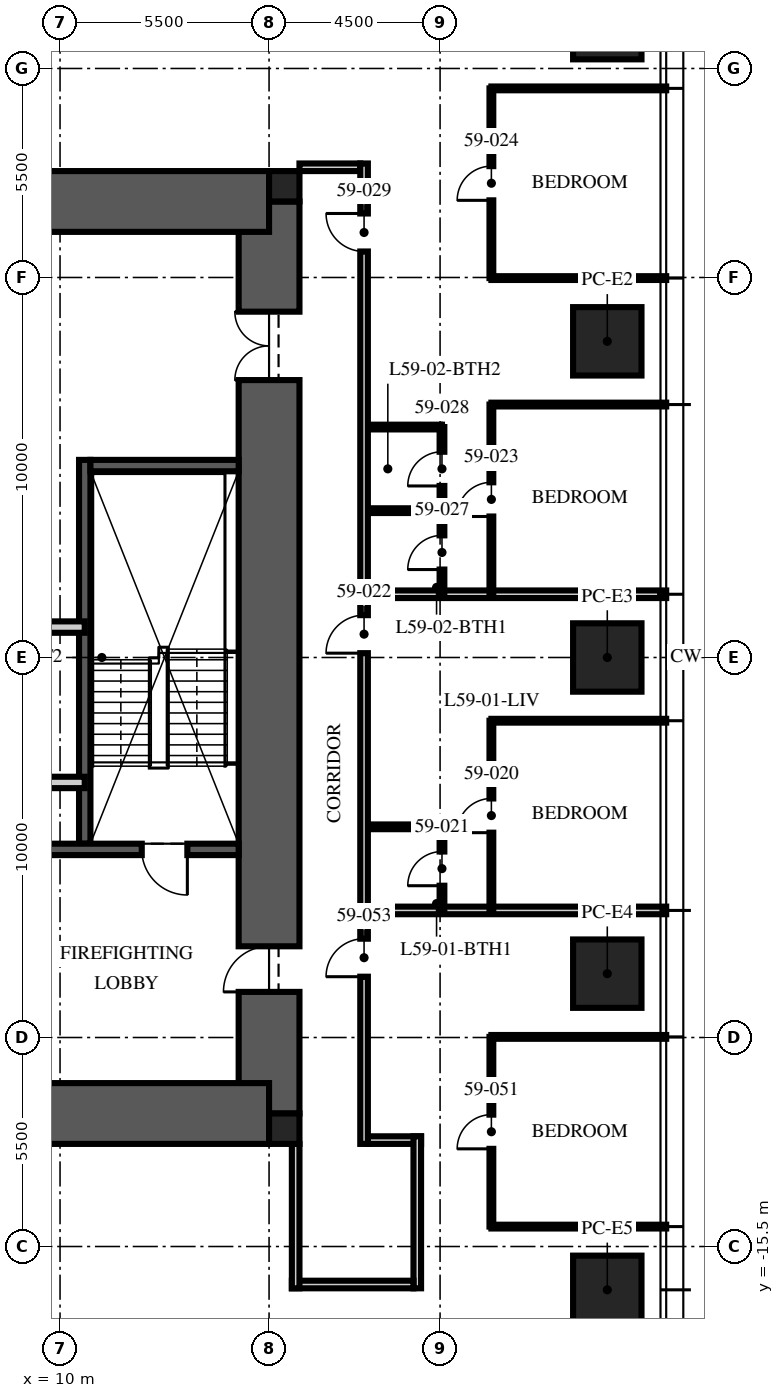
"""IFC4 building model, lengths in metres.
Left out: names, types, materials, properties, quantities, classifications, styles, units other than length and angle.
Written with IfcOpenShell. Run it as: python <this file> out.ifc"""

import sys

from ifc_helpers import new_model, si_unit, direction, frame, frame_2d, origin, origin_2d, place, context, subcontext, project, spatial, rectangle, extrude, element, fill, save


model = new_model("IFC4")
c1 = context("Model", 3, precision=1e-05, world=origin(), true_north=direction((0.0, 1.0)))
c2 = subcontext(c1, "Body", "Model", "MODEL_VIEW")
j1 = project(units=[si_unit("LENGTHUNIT", "METRE"), si_unit("PLANEANGLEUNIT", "RADIAN")], contexts=[c1])
p1 = place(None, origin())
s1 = spatial("IfcSite", under=j1, at=p1, CompositionType="ELEMENT")
p2 = place(p1, origin())
s2 = spatial("IfcBuilding", under=s1, at=p2, CompositionType="ELEMENT")
p3 = place(p2, frame((0.0, 0.0, 237.0)))
s3 = spatial("IfcBuildingStorey", under=s2, at=p3, CompositionType="ELEMENT", Elevation=237.0)
p4 = place(p3, frame((15.5, -12.0, -0.25), z_axis=(0.0, 0.0, 1.0), x_axis=(0.0, 1.0, 0.0)))
e1 = element("IfcWall", 1, at=p4, inside=s3, PredefinedType="SHEAR", context=c2, shape_type="SweptSolid", body=[
    extrude(rectangle(XDim=24.0, YDim=1.6, at=frame_2d((12.0, 0.0))), origin(), (0.0, 0.0, 1.0), 3.75),
])
p5 = place(p4, frame((3.2, 0.0, 0.25)))
e2 = element("IfcOpeningElement", 2, at=p5, cuts=e1, PredefinedType="OPENING", context=c2, shape_type="SweptSolid", body=[
    extrude(rectangle(XDim=1.2, YDim=2.1, at=frame_2d((0.6, 1.05))), frame((0.0, 0.81, 0.0), z_axis=(0.0, -1.0, 0.0), x_axis=(1.0, 0.0, 0.0)), (0.0, 0.0, 1.0), 1.62),
])
p6 = place(p4, frame((19.3, 0.0, 0.25)))
e3 = element("IfcOpeningElement", 3, at=p6, cuts=e1, PredefinedType="OPENING", context=c2, shape_type="SweptSolid", body=[
    extrude(rectangle(XDim=1.8, YDim=2.1, at=frame_2d((0.9, 1.05))), frame((0.0, 0.81, 0.0), z_axis=(0.0, -1.0, 0.0), x_axis=(1.0, 0.0, 0.0)), (0.0, 0.0, 1.0), 1.62),
])
for number, where, z_axis, x_axis in (
    (4, (-15.5, 12.0, -0.25), (0.0, 0.0, 1.0), (1.0, 0.0, 0.0)),
    (5, (-15.5, -12.0, -0.25), (0.0, 0.0, 1.0), (1.0, 0.0, 0.0)),
):
    element("IfcWall", number, at=place(p3, frame(where, z_axis=z_axis, x_axis=x_axis)), inside=s3, PredefinedType="SHEAR", context=c2, shape_type="SweptSolid", body=[
        extrude(rectangle(XDim=31.0, YDim=1.6, at=frame_2d((15.5, 0.0))), origin(), (0.0, 0.0, 1.0), 3.75),
    ])
for number, where, z_axis, x_axis in (
    (6, (15.9, 12.4, -0.25), (0.0, 0.0, 1.0), (1.0, 0.0, 0.0)),
    (7, (15.9, -12.4, -0.25), (0.0, 0.0, 1.0), (1.0, 0.0, 0.0)),
):
    element("IfcColumn", number, at=place(p3, frame(where, z_axis=z_axis, x_axis=x_axis)), inside=s3, PredefinedType="COLUMN", context=c2, shape_type="SweptSolid", body=[
        extrude(rectangle(XDim=0.8, YDim=0.8, at=origin_2d()), origin(), (0.0, 0.0, 1.0), 3.75),
    ])
for number, where, z_axis, x_axis in (
    (8, (24.4, 16.64, 0.0), (0.0, 0.0, 1.0), (0.0, 1.0, 0.0)),
    (9, (24.4, 8.32, 0.0), (0.0, 0.0, 1.0), (0.0, 1.0, 0.0)),
    (10, (24.4, 0.0, 0.0), (0.0, 0.0, 1.0), (0.0, 1.0, 0.0)),
    (11, (24.4, -8.32, 0.0), (0.0, 0.0, 1.0), (0.0, 1.0, 0.0)),
    (12, (24.4, -16.64, 0.0), (0.0, 0.0, 1.0), (0.0, 1.0, 0.0)),
):
    element("IfcColumn", number, at=place(p3, frame(where, z_axis=z_axis, x_axis=x_axis)), inside=s3, PredefinedType="COLUMN", context=c2, shape_type="SweptSolid", body=[
        extrude(rectangle(XDim=1.8, YDim=1.8, at=origin_2d()), origin(), (0.0, 0.0, 1.0), 3.75),
    ])
p7 = place(p3, frame((10.65, -4.9, 0.0), z_axis=(0.0, 0.0, 1.0), x_axis=(0.0, 1.0, 0.0)))
e13 = element("IfcWall", 13, at=p7, inside=s3, PredefinedType="SOLIDWALL", context=c2, shape_type="SweptSolid", body=[
    extrude(rectangle(XDim=10.1, YDim=0.3, at=frame_2d((5.05, 0.0))), origin(), (0.0, 0.0, 1.0), 3.5),
])
p8 = place(p3, frame((14.7, -5.05, 0.0), z_axis=(0.0, 0.0, 1.0), x_axis=(-1.0, 0.0, 0.0)))
e14 = element("IfcWall", 14, at=p8, inside=s3, PredefinedType="SOLIDWALL", context=c2, shape_type="SweptSolid", body=[
    extrude(rectangle(XDim=5.9, YDim=0.3, at=frame_2d((2.95, 0.0))), origin(), (0.0, 0.0, 1.0), 3.5),
])
p9 = place(p8, frame((1.35, 0.0, 0.0)))
e15 = element("IfcOpeningElement", 15, at=p9, cuts=e14, PredefinedType="OPENING", context=c2, shape_type="SweptSolid", body=[
    extrude(rectangle(XDim=1.2, YDim=2.1, at=frame_2d((0.6, 1.05))), frame((0.0, 0.16, 0.0), z_axis=(0.0, -1.0, 0.0), x_axis=(1.0, 0.0, 0.0)), (0.0, 0.0, 1.0), 0.32),
])
p10 = place(p3, frame((14.7, 5.05, 0.0), z_axis=(0.0, 0.0, 1.0), x_axis=(-1.0, 0.0, 0.0)))
e16 = element("IfcWall", 16, at=p10, inside=s3, PredefinedType="SOLIDWALL", context=c2, shape_type="SweptSolid", body=[
    extrude(rectangle(XDim=3.9, YDim=0.3, at=frame_2d((1.95, 0.0))), origin(), (0.0, 0.0, 1.0), 3.5),
])
p11 = place(p3, frame((-10.65, 0.8, 0.0), z_axis=(0.0, 0.0, 1.0), x_axis=(1.0, 0.0, 0.0)))
e17 = element("IfcWall", 17, at=p11, inside=s3, PredefinedType="PARTITIONING", context=c2, shape_type="SweptSolid", body=[
    extrude(rectangle(XDim=21.3, YDim=0.3, at=frame_2d((10.65, 0.0))), origin(), (0.0, 0.0, 1.0), 3.5),
])
p12 = place(p11, frame((10.05, 0.0, 0.0)))
e18 = element("IfcOpeningElement", 18, at=p12, cuts=e17, PredefinedType="OPENING", context=c2, shape_type="SweptSolid", body=[
    extrude(rectangle(XDim=1.2, YDim=2.1, at=frame_2d((0.6, 1.05))), frame((0.0, 0.16, 0.0), z_axis=(0.0, -1.0, 0.0), x_axis=(1.0, 0.0, 0.0)), (0.0, 0.0, 1.0), 0.32),
])
p13 = place(p11, frame((1.74, 0.0, 0.0)))
e19 = element("IfcOpeningElement", 19, at=p13, cuts=e17, PredefinedType="OPENING", context=c2, shape_type="SweptSolid", body=[
    extrude(rectangle(XDim=0.9, YDim=2.1, at=frame_2d((0.45, 1.05))), frame((0.0, 0.16, 0.0), z_axis=(0.0, -1.0, 0.0), x_axis=(1.0, 0.0, 0.0)), (0.0, 0.0, 1.0), 0.32),
])
p14 = place(p3, frame((10.65, -3.288, 0.0), z_axis=(0.0, 0.0, 1.0), x_axis=(-1.0, 0.0, 0.0)))
e20 = element("IfcWall", 20, at=p14, inside=s3, PredefinedType="PARTITIONING", context=c2, shape_type="SweptSolid", body=[
    extrude(rectangle(XDim=7.35, YDim=0.3, at=frame_2d((3.675, 0.0))), origin(), (0.0, 0.0, 1.0), 3.5),
])
p15 = place(p3, frame((18.1, -12.7, 0.0), z_axis=(0.0, 0.0, 1.0), x_axis=(1.0, 0.0, 0.0)))
e21 = element("IfcWall", 21, at=p15, inside=s3, PredefinedType="PARTITIONING", context=c2, shape_type="SweptSolid", body=[
    extrude(rectangle(XDim=1.4, YDim=0.2, at=frame_2d((0.7, 0.0))), origin(), (0.0, 0.0, 1.0), 2.81),
])
p16 = place(p3, frame((19.4, -12.6, 0.0), z_axis=(0.0, 0.0, 1.0), x_axis=(0.0, -1.0, 0.0)))
e22 = element("IfcWall", 22, at=p16, inside=s3, PredefinedType="PARTITIONING", context=c2, shape_type="SweptSolid", body=[
    extrude(rectangle(XDim=4.0, YDim=0.2, at=frame_2d((2.0, 0.0))), origin(), (0.0, 0.0, 1.0), 2.6),
])
p17 = place(p3, frame((19.3, -16.5, 0.0), z_axis=(0.0, 0.0, 1.0), x_axis=(-1.0, 0.0, 0.0)))
e23 = element("IfcWall", 23, at=p17, inside=s3, PredefinedType="PARTITIONING", context=c2, shape_type="SweptSolid", body=[
    extrude(rectangle(XDim=3.2, YDim=0.2, at=frame_2d((1.6, 0.0))), origin(), (0.0, 0.0, 1.0), 2.3),
])
p18 = place(p3, frame((16.2, -16.6, 0.0), z_axis=(0.0, 0.0, 1.0), x_axis=(0.0, 1.0, 0.0)))
e24 = element("IfcWall", 24, at=p18, inside=s3, PredefinedType="PARTITIONING", context=c2, shape_type="SweptSolid", body=[
    extrude(rectangle(XDim=3.8, YDim=0.2, at=frame_2d((1.9, 0.0))), origin(), (0.0, 0.0, 1.0), 2.3),
])
p19 = place(p3, frame((16.3, 12.9, 0.0), z_axis=(0.0, 0.0, 1.0), x_axis=(1.0, 0.0, 0.0)))
e25 = element("IfcWall", 25, at=p19, inside=s3, PredefinedType="PARTITIONING", context=c2, shape_type="SweptSolid", body=[
    extrude(rectangle(XDim=1.6, YDim=0.2, at=frame_2d((0.8, 0.0))), origin(), (0.0, 0.0, 1.0), 2.3),
])
p20 = place(p3, frame((18.1, -6.656, 0.0), z_axis=(0.0, 0.0, 1.0), x_axis=(1.0, 0.0, 0.0)))
e26 = element("IfcWall", 26, at=p20, inside=s3, PredefinedType="PARTITIONING", context=c2, shape_type="SweptSolid", body=[
    extrude(rectangle(XDim=7.85, YDim=0.2, at=frame_2d((3.925, 0.0))), origin(), (0.0, 0.0, 1.0), 2.91),
])
p21 = place(p3, frame((21.35, -1.664, 0.0), z_axis=(0.0, 0.0, 1.0), x_axis=(1.0, 0.0, 0.0)))
e27 = element("IfcWall", 27, at=p21, inside=s3, PredefinedType="PARTITIONING", context=c2, shape_type="SweptSolid", body=[
    extrude(rectangle(XDim=4.6, YDim=0.1, at=frame_2d((2.3, 0.0))), origin(), (0.0, 0.0, 1.0), 2.91),
])
p22 = place(p3, frame((18.1, 1.664, 0.0), z_axis=(0.0, 0.0, 1.0), x_axis=(1.0, 0.0, 0.0)))
e28 = element("IfcWall", 28, at=p22, inside=s3, PredefinedType="PARTITIONING", context=c2, shape_type="SweptSolid", body=[
    extrude(rectangle(XDim=7.85, YDim=0.2, at=frame_2d((3.925, 0.0))), origin(), (0.0, 0.0, 1.0), 2.91),
])
for number, where, z_axis, x_axis in (
    (29, (21.35, 6.656, 0.0), (0.0, 0.0, 1.0), (1.0, 0.0, 0.0)),
    (30, (21.35, 9.984, 0.0), (0.0, 0.0, 1.0), (1.0, 0.0, 0.0)),
    (31, (21.35, 14.976, 0.0), (0.0, 0.0, 1.0), (1.0, 0.0, 0.0)),
    (32, (21.35, -14.976, 0.0), (0.0, 0.0, 1.0), (1.0, 0.0, 0.0)),
    (33, (21.35, -9.984, 0.0), (0.0, 0.0, 1.0), (1.0, 0.0, 0.0)),
):
    element("IfcWall", number, at=place(p3, frame(where, z_axis=z_axis, x_axis=x_axis)), inside=s3, PredefinedType="PARTITIONING", context=c2, shape_type="SweptSolid", body=[
        extrude(rectangle(XDim=4.6, YDim=0.1, at=frame_2d((2.3, 0.0))), origin(), (0.0, 0.0, 1.0), 2.91),
    ])
p23 = place(p3, frame((21.35, -6.656, 0.0), z_axis=(0.0, 0.0, 1.0), x_axis=(0.0, 1.0, 0.0)))
e34 = element("IfcWall", 34, at=p23, inside=s3, PredefinedType="PARTITIONING", context=c2, shape_type="SweptSolid", body=[
    extrude(rectangle(XDim=4.992, YDim=0.1, at=frame_2d((2.496, 0.0))), origin(), (0.0, 0.0, 1.0), 2.81),
])
p24 = place(p23, frame((2.046, 0.0, 0.0)))
e35 = element("IfcOpeningElement", 35, at=p24, cuts=e34, PredefinedType="OPENING", context=c2, shape_type="SweptSolid", body=[
    extrude(rectangle(XDim=0.9, YDim=2.1, at=frame_2d((0.45, 1.05))), frame((0.0, 0.06, 0.0), z_axis=(0.0, -1.0, 0.0), x_axis=(1.0, 0.0, 0.0)), (0.0, 0.0, 1.0), 0.12),
])
p25 = place(p3, frame((20.05, -6.656, 0.0), z_axis=(0.0, 0.0, 1.0), x_axis=(0.0, 1.0, 0.0)))
e36 = element("IfcWall", 36, at=p25, inside=s3, PredefinedType="PARTITIONING", context=c2, shape_type="SweptSolid", body=[
    extrude(rectangle(XDim=2.2, YDim=0.125, at=frame_2d((1.1, 0.0))), origin(), (0.0, 0.0, 1.0), 3.5),
])
p26 = place(p25, frame((0.65, 0.0, 0.0)))
e37 = element("IfcOpeningElement", 37, at=p26, cuts=e36, PredefinedType="OPENING", context=c2, shape_type="SweptSolid", body=[
    extrude(rectangle(XDim=0.9, YDim=2.1, at=frame_2d((0.45, 1.05))), frame((0.0, 0.073, 0.0), z_axis=(0.0, -1.0, 0.0), x_axis=(1.0, 0.0, 0.0)), (0.0, 0.0, 1.0), 0.145),
])
p27 = place(p3, frame((18.1, -4.456, 0.0), z_axis=(0.0, 0.0, 1.0), x_axis=(1.0, 0.0, 0.0)))
e38 = element("IfcWall", 38, at=p27, inside=s3, PredefinedType="PARTITIONING", context=c2, shape_type="SweptSolid", body=[
    extrude(rectangle(XDim=1.95, YDim=0.125, at=frame_2d((0.975, 0.0))), origin(), (0.0, 0.0, 1.0), 3.5),
])
p28 = place(p3, frame((21.35, 1.664, 0.0), z_axis=(0.0, 0.0, 1.0), x_axis=(0.0, 1.0, 0.0)))
e39 = element("IfcWall", 39, at=p28, inside=s3, PredefinedType="PARTITIONING", context=c2, shape_type="SweptSolid", body=[
    extrude(rectangle(XDim=4.992, YDim=0.1, at=frame_2d((2.496, 0.0))), origin(), (0.0, 0.0, 1.0), 2.81),
])
p29 = place(p28, frame((2.046, 0.0, 0.0)))
e40 = element("IfcOpeningElement", 40, at=p29, cuts=e39, PredefinedType="OPENING", context=c2, shape_type="SweptSolid", body=[
    extrude(rectangle(XDim=0.9, YDim=2.1, at=frame_2d((0.45, 1.05))), frame((0.0, 0.06, 0.0), z_axis=(0.0, -1.0, 0.0), x_axis=(1.0, 0.0, 0.0)), (0.0, 0.0, 1.0), 0.12),
])
p30 = place(p3, frame((21.35, 9.984, 0.0), z_axis=(0.0, 0.0, 1.0), x_axis=(0.0, 1.0, 0.0)))
e41 = element("IfcWall", 41, at=p30, inside=s3, PredefinedType="PARTITIONING", context=c2, shape_type="SweptSolid", body=[
    extrude(rectangle(XDim=4.992, YDim=0.1, at=frame_2d((2.496, 0.0))), origin(), (0.0, 0.0, 1.0), 2.81),
])
p31 = place(p30, frame((2.046, 0.0, 0.0)))
e42 = element("IfcOpeningElement", 42, at=p31, cuts=e41, PredefinedType="OPENING", context=c2, shape_type="SweptSolid", body=[
    extrude(rectangle(XDim=0.9, YDim=2.1, at=frame_2d((0.45, 1.05))), frame((0.0, 0.06, 0.0), z_axis=(0.0, -1.0, 0.0), x_axis=(1.0, 0.0, 0.0)), (0.0, 0.0, 1.0), 0.12),
])
p32 = place(p3, frame((20.05, 1.664, 0.0), z_axis=(0.0, 0.0, 1.0), x_axis=(0.0, 1.0, 0.0)))
e43 = element("IfcWall", 43, at=p32, inside=s3, PredefinedType="PARTITIONING", context=c2, shape_type="SweptSolid", body=[
    extrude(rectangle(XDim=4.4, YDim=0.125, at=frame_2d((2.2, 0.0))), origin(), (0.0, 0.0, 1.0), 2.81),
])
p33 = place(p32, frame((0.65, 0.0, 0.0)))
e44 = element("IfcOpeningElement", 44, at=p33, cuts=e43, PredefinedType="OPENING", context=c2, shape_type="SweptSolid", body=[
    extrude(rectangle(XDim=0.9, YDim=2.1, at=frame_2d((0.45, 1.05))), frame((0.0, 0.073, 0.0), z_axis=(0.0, -1.0, 0.0), x_axis=(1.0, 0.0, 0.0)), (0.0, 0.0, 1.0), 0.145),
])
p34 = place(p32, frame((2.85, 0.0, 0.0)))
e45 = element("IfcOpeningElement", 45, at=p34, cuts=e43, PredefinedType="OPENING", context=c2, shape_type="SweptSolid", body=[
    extrude(rectangle(XDim=0.9, YDim=2.1, at=frame_2d((0.45, 1.05))), frame((0.0, 0.073, 0.0), z_axis=(0.0, -1.0, 0.0), x_axis=(1.0, 0.0, 0.0)), (0.0, 0.0, 1.0), 0.145),
])
for number, where, z_axis, x_axis in (
    (46, (18.1, 3.864, 0.0), (0.0, 0.0, 1.0), (1.0, 0.0, 0.0)),
    (47, (18.1, 6.064, 0.0), (0.0, 0.0, 1.0), (1.0, 0.0, 0.0)),
):
    element("IfcWall", number, at=place(p3, frame(where, z_axis=z_axis, x_axis=x_axis)), inside=s3, PredefinedType="PARTITIONING", context=c2, shape_type="SweptSolid", body=[
        extrude(rectangle(XDim=1.95, YDim=0.125, at=frame_2d((0.975, 0.0))), origin(), (0.0, 0.0, 1.0), 3.5),
    ])
p35 = place(p3, frame((21.35, -14.976, 0.0), z_axis=(0.0, 0.0, 1.0), x_axis=(0.0, 1.0, 0.0)))
e48 = element("IfcWall", 48, at=p35, inside=s3, PredefinedType="PARTITIONING", context=c2, shape_type="SweptSolid", body=[
    extrude(rectangle(XDim=4.992, YDim=0.1, at=frame_2d((2.496, 0.0))), origin(), (0.0, 0.0, 1.0), 2.81),
])
p36 = place(p35, frame((2.046, 0.0, 0.0)))
e49 = element("IfcOpeningElement", 49, at=p36, cuts=e48, PredefinedType="OPENING", context=c2, shape_type="SweptSolid", body=[
    extrude(rectangle(XDim=0.9, YDim=2.1, at=frame_2d((0.45, 1.05))), frame((0.0, 0.06, 0.0), z_axis=(0.0, -1.0, 0.0), x_axis=(1.0, 0.0, 0.0)), (0.0, 0.0, 1.0), 0.12),
])
p37 = place(p3, frame((18.0, -12.8, 0.0), z_axis=(0.0, 0.0, 1.0), x_axis=(0.0, 1.0, 0.0)))
e50 = element("IfcWall", 50, at=p37, inside=s3, PredefinedType="PARTITIONING", context=c2, shape_type="SweptSolid", body=[
    extrude(rectangle(XDim=25.8, YDim=0.2, at=frame_2d((12.9, 0.0))), origin(), (0.0, 0.0, 1.0), 2.6),
])
p38 = place(p37, frame((12.914, 0.0, 0.0)))
e51 = element("IfcOpeningElement", 51, at=p38, cuts=e50, PredefinedType="OPENING", context=c2, shape_type="SweptSolid", body=[
    extrude(rectangle(XDim=1.0, YDim=2.2, at=frame_2d((0.5, 1.1))), frame((0.0, 0.11, 0.0), z_axis=(0.0, -1.0, 0.0), x_axis=(1.0, 0.0, 0.0)), (0.0, 0.0, 1.0), 0.22),
])
p39 = place(p37, frame((23.484, 0.0, 0.0)))
e52 = element("IfcOpeningElement", 52, at=p39, cuts=e50, PredefinedType="OPENING", context=c2, shape_type="SweptSolid", body=[
    extrude(rectangle(XDim=1.0, YDim=2.2, at=frame_2d((0.5, 1.1))), frame((0.0, 0.11, 0.0), z_axis=(0.0, -1.0, 0.0), x_axis=(1.0, 0.0, 0.0)), (0.0, 0.0, 1.0), 0.22),
])
p40 = place(p37, frame((4.4, 0.0, 0.0)))
e53 = element("IfcOpeningElement", 53, at=p40, cuts=e50, PredefinedType="OPENING", context=c2, shape_type="SweptSolid", body=[
    extrude(rectangle(XDim=1.0, YDim=2.2, at=frame_2d((0.5, 1.1))), frame((0.0, 0.11, 0.0), z_axis=(0.0, -1.0, 0.0), x_axis=(1.0, 0.0, 0.0)), (0.0, 0.0, 1.0), 0.22),
])
p41 = place(p9, origin())
e54 = element("IfcDoor", 54, at=p41, inside=s3, OperationType="SINGLE_SWING_LEFT", PredefinedType="DOOR", context=c2, shape_type="SweptSolid", body=[
    extrude(rectangle(XDim=1.2, YDim=2.1, at=frame_2d((0.6, 1.05))), frame((0.0, 0.025, 0.0), z_axis=(0.0, -1.0, 0.0), x_axis=(1.0, 0.0, 0.0)), (0.0, 0.0, 1.0), 0.05),
])
fill(e15, e54)
p42 = place(p5, origin())
e55 = element("IfcDoor", 55, at=p42, inside=s3, OperationType="SINGLE_SWING_LEFT", PredefinedType="DOOR", context=c2, shape_type="SweptSolid", body=[
    extrude(rectangle(XDim=1.2, YDim=2.1, at=frame_2d((0.6, 1.05))), frame((0.0, 0.025, 0.0), z_axis=(0.0, -1.0, 0.0), x_axis=(1.0, 0.0, 0.0)), (0.0, 0.0, 1.0), 0.05),
])
fill(e2, e55)
p43 = place(p6, origin())
e56 = element("IfcDoor", 56, at=p43, inside=s3, OperationType="DOUBLE_DOOR_SINGLE_SWING", PredefinedType="DOOR", context=c2, shape_type="SweptSolid", body=[
    extrude(rectangle(XDim=1.8, YDim=2.1, at=frame_2d((0.9, 1.05))), frame((0.0, 0.025, 0.0), z_axis=(0.0, -1.0, 0.0), x_axis=(1.0, 0.0, 0.0)), (0.0, 0.0, 1.0), 0.05),
])
fill(e3, e56)
p44 = place(p24, origin())
e57 = element("IfcDoor", 57, at=p44, inside=s3, OperationType="SINGLE_SWING_LEFT", PredefinedType="DOOR", context=c2, shape_type="SweptSolid", body=[
    extrude(rectangle(XDim=0.9, YDim=2.1, at=frame_2d((0.45, 1.05))), frame((0.0, 0.025, 0.0), z_axis=(0.0, -1.0, 0.0), x_axis=(1.0, 0.0, 0.0)), (0.0, 0.0, 1.0), 0.05),
])
fill(e35, e57)
p45 = place(p26, origin())
e58 = element("IfcDoor", 58, at=p45, inside=s3, OperationType="SINGLE_SWING_LEFT", PredefinedType="DOOR", context=c2, shape_type="SweptSolid", body=[
    extrude(rectangle(XDim=0.9, YDim=2.1, at=frame_2d((0.45, 1.05))), frame((0.0, 0.025, 0.0), z_axis=(0.0, -1.0, 0.0), x_axis=(1.0, 0.0, 0.0)), (0.0, 0.0, 1.0), 0.05),
])
fill(e37, e58)
p46 = place(p38, origin())
e59 = element("IfcDoor", 59, at=p46, inside=s3, OperationType="SINGLE_SWING_LEFT", PredefinedType="DOOR", context=c2, shape_type="SweptSolid", body=[
    extrude(rectangle(XDim=1.0, YDim=2.2, at=frame_2d((0.5, 1.1))), frame((0.0, 0.025, 0.0), z_axis=(0.0, -1.0, 0.0), x_axis=(1.0, 0.0, 0.0)), (0.0, 0.0, 1.0), 0.05),
])
fill(e51, e59)
p47 = place(p29, origin())
e60 = element("IfcDoor", 60, at=p47, inside=s3, OperationType="SINGLE_SWING_LEFT", PredefinedType="DOOR", context=c2, shape_type="SweptSolid", body=[
    extrude(rectangle(XDim=0.9, YDim=2.1, at=frame_2d((0.45, 1.05))), frame((0.0, 0.025, 0.0), z_axis=(0.0, -1.0, 0.0), x_axis=(1.0, 0.0, 0.0)), (0.0, 0.0, 1.0), 0.05),
])
fill(e40, e60)
p48 = place(p31, origin())
e61 = element("IfcDoor", 61, at=p48, inside=s3, OperationType="SINGLE_SWING_LEFT", PredefinedType="DOOR", context=c2, shape_type="SweptSolid", body=[
    extrude(rectangle(XDim=0.9, YDim=2.1, at=frame_2d((0.45, 1.05))), frame((0.0, 0.025, 0.0), z_axis=(0.0, -1.0, 0.0), x_axis=(1.0, 0.0, 0.0)), (0.0, 0.0, 1.0), 0.05),
])
fill(e42, e61)
p49 = place(p33, origin())
e62 = element("IfcDoor", 62, at=p49, inside=s3, OperationType="SINGLE_SWING_LEFT", PredefinedType="DOOR", context=c2, shape_type="SweptSolid", body=[
    extrude(rectangle(XDim=0.9, YDim=2.1, at=frame_2d((0.45, 1.05))), frame((0.0, 0.025, 0.0), z_axis=(0.0, -1.0, 0.0), x_axis=(1.0, 0.0, 0.0)), (0.0, 0.0, 1.0), 0.05),
])
fill(e44, e62)
p50 = place(p34, origin())
e63 = element("IfcDoor", 63, at=p50, inside=s3, OperationType="SINGLE_SWING_LEFT", PredefinedType="DOOR", context=c2, shape_type="SweptSolid", body=[
    extrude(rectangle(XDim=0.9, YDim=2.1, at=frame_2d((0.45, 1.05))), frame((0.0, 0.025, 0.0), z_axis=(0.0, -1.0, 0.0), x_axis=(1.0, 0.0, 0.0)), (0.0, 0.0, 1.0), 0.05),
])
fill(e45, e63)
p51 = place(p39, origin())
e64 = element("IfcDoor", 64, at=p51, inside=s3, OperationType="SINGLE_SWING_RIGHT", PredefinedType="DOOR", context=c2, shape_type="SweptSolid", body=[
    extrude(rectangle(XDim=1.0, YDim=2.2, at=frame_2d((0.5, 1.1))), frame((0.0, 0.025, 0.0), z_axis=(0.0, -1.0, 0.0), x_axis=(1.0, 0.0, 0.0)), (0.0, 0.0, 1.0), 0.05),
])
fill(e52, e64)
p52 = place(p36, origin())
e65 = element("IfcDoor", 65, at=p52, inside=s3, OperationType="SINGLE_SWING_LEFT", PredefinedType="DOOR", context=c2, shape_type="SweptSolid", body=[
    extrude(rectangle(XDim=0.9, YDim=2.1, at=frame_2d((0.45, 1.05))), frame((0.0, 0.025, 0.0), z_axis=(0.0, -1.0, 0.0), x_axis=(1.0, 0.0, 0.0)), (0.0, 0.0, 1.0), 0.05),
])
fill(e49, e65)
p53 = place(p40, origin())
e66 = element("IfcDoor", 66, at=p53, inside=s3, OperationType="SINGLE_SWING_LEFT", PredefinedType="DOOR", context=c2, shape_type="SweptSolid", body=[
    extrude(rectangle(XDim=1.0, YDim=2.2, at=frame_2d((0.5, 1.1))), frame((0.0, 0.025, 0.0), z_axis=(0.0, -1.0, 0.0), x_axis=(1.0, 0.0, 0.0)), (0.0, 0.0, 1.0), 0.05),
])
fill(e53, e66)
save(model, sys.argv[1])
